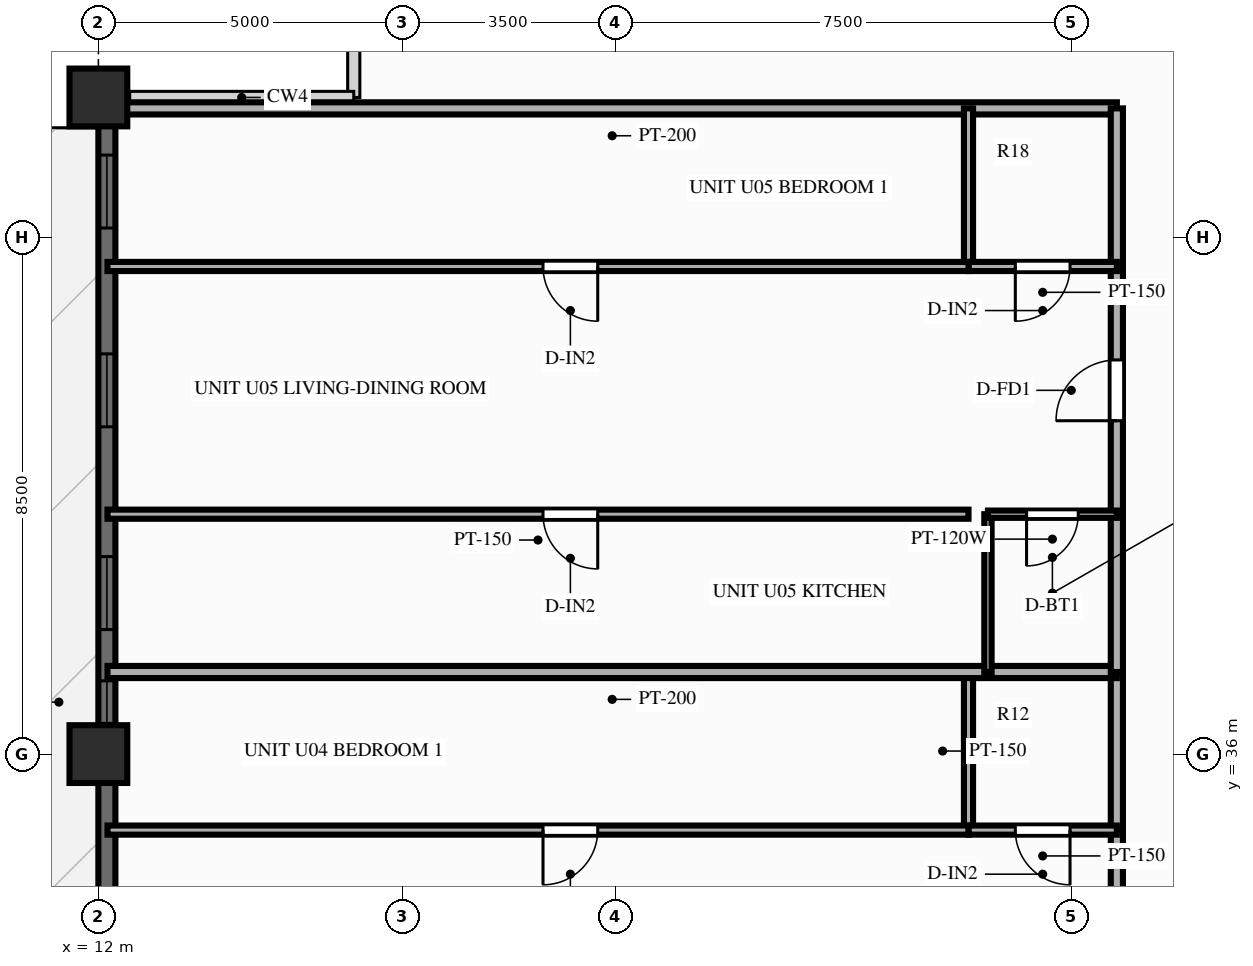
"""IFC4 building model, lengths in metres.
Left out: names, types, materials, properties, quantities, classifications, styles, units other than length and angle.
Written with IfcOpenShell. Run it as: python <this file> out.ifc"""

import sys

from ifc_helpers import new_model, si_unit, direction, frame, frame_2d, origin, origin_2d, place, context, subcontext, project, spatial, rectangle, extrude, source, transform, mapped, element, fill, save


model = new_model("IFC4")
c1 = context("Model", 3, precision=1e-05, world=origin(), true_north=direction((0.0, 1.0)))
c2 = subcontext(c1, "Body", "Model", "MODEL_VIEW")
j1 = project(units=[si_unit("LENGTHUNIT", "METRE"), si_unit("PLANEANGLEUNIT", "RADIAN")], contexts=[c1])
p1 = place(None, origin())
s1 = spatial("IfcSite", under=j1, at=p1, CompositionType="ELEMENT")
p2 = place(p1, origin())
s2 = spatial("IfcBuilding", under=s1, at=p2, CompositionType="ELEMENT")
p3 = place(p2, frame((0.0, 0.0, 135.75)))
s3 = spatial("IfcBuildingStorey", under=s2, at=p3, CompositionType="ELEMENT", Elevation=135.75)
m1 = source(origin(), c2, "Body", "SweptSolid", [
    extrude(rectangle(XDim=0.95, YDim=0.95, at=origin_2d()), origin(), (0.0, 0.0, 1.0), 3.0),
])
for number, where, z_axis, x_axis in (
    (1, (12.0, 46.8, 0.0), (0.0, 0.0, 1.0), (1.0, 0.0, 0.0)),
    (2, (12.0, 36.0, 0.0), (0.0, 0.0, 1.0), (1.0, 0.0, 0.0)),
):
    element("IfcColumn", number, at=place(p3, frame(where, z_axis=z_axis, x_axis=x_axis)), inside=s3, PredefinedType="COLUMN", context=c2, shape_type="MappedRepresentation", body=[
        mapped(m1, transform((0.0, 0.0, 0.0), scale=1.0)),
    ])
p4 = place(p3, frame((12.14, 7.2, 0.0), z_axis=(0.0, 0.0, 1.0), x_axis=(0.0, 1.0, 0.0)))
e3 = element("IfcWall", 3, at=p4, inside=s3, PredefinedType="SOLIDWALL", context=c2, shape_type="SweptSolid", body=[
    extrude(rectangle(XDim=39.6, YDim=0.28, at=frame_2d((19.8, 0.0))), origin(), (0.0, 0.0, 1.0), 2.28),
])
p5 = place(p4, frame((0.945, 0.0, 0.25)))
e4 = element("IfcOpeningElement", 4, at=p5, cuts=e3, PredefinedType="OPENING", context=c2, shape_type="SweptSolid", body=[
    extrude(rectangle(XDim=1.2, YDim=1.5, at=frame_2d((0.6, 0.75))), frame((0.0, 0.152, 0.0), z_axis=(0.0, -1.0, 0.0), x_axis=(1.0, 0.0, 0.0)), (0.0, 0.0, 1.0), 0.304),
])
p6 = place(p4, frame((4.213, 0.0, 0.25)))
e5 = element("IfcOpeningElement", 5, at=p6, cuts=e3, PredefinedType="OPENING", context=c2, shape_type="SweptSolid", body=[
    extrude(rectangle(XDim=1.2, YDim=1.5, at=frame_2d((0.6, 0.75))), frame((0.0, 0.152, 0.0), z_axis=(0.0, -1.0, 0.0), x_axis=(1.0, 0.0, 0.0)), (0.0, 0.0, 1.0), 0.304),
])
p7 = place(p4, frame((7.55, 0.0, 0.25)))
e6 = element("IfcOpeningElement", 6, at=p7, cuts=e3, PredefinedType="OPENING", context=c2, shape_type="SweptSolid", body=[
    extrude(rectangle(XDim=1.2, YDim=1.5, at=frame_2d((0.6, 0.75))), frame((0.0, 0.152, 0.0), z_axis=(0.0, -1.0, 0.0), x_axis=(1.0, 0.0, 0.0)), (0.0, 0.0, 1.0), 0.304),
])
p8 = place(p4, frame((13.483, 0.0, 0.25)))
e7 = element("IfcOpeningElement", 7, at=p8, cuts=e3, PredefinedType="OPENING", context=c2, shape_type="SweptSolid", body=[
    extrude(rectangle(XDim=1.2, YDim=1.5, at=frame_2d((0.6, 0.75))), frame((0.0, 0.152, 0.0), z_axis=(0.0, -1.0, 0.0), x_axis=(1.0, 0.0, 0.0)), (0.0, 0.0, 1.0), 0.304),
])
p9 = place(p4, frame((16.82, 0.0, 0.25)))
e8 = element("IfcOpeningElement", 8, at=p9, cuts=e3, PredefinedType="OPENING", context=c2, shape_type="SweptSolid", body=[
    extrude(rectangle(XDim=1.2, YDim=1.5, at=frame_2d((0.6, 0.75))), frame((0.0, 0.152, 0.0), z_axis=(0.0, -1.0, 0.0), x_axis=(1.0, 0.0, 0.0)), (0.0, 0.0, 1.0), 0.304),
])
p10 = place(p4, frame((19.2, 0.0, 0.25)))
e9 = element("IfcOpeningElement", 9, at=p10, cuts=e3, PredefinedType="OPENING", context=c2, shape_type="SweptSolid", body=[
    extrude(rectangle(XDim=1.2, YDim=1.5, at=frame_2d((0.6, 0.75))), frame((0.0, 0.152, 0.0), z_axis=(0.0, -1.0, 0.0), x_axis=(1.0, 0.0, 0.0)), (0.0, 0.0, 1.0), 0.304),
])
p11 = place(p4, frame((21.578, 0.0, 0.25)))
e10 = element("IfcOpeningElement", 10, at=p11, cuts=e3, PredefinedType="OPENING", context=c2, shape_type="SweptSolid", body=[
    extrude(rectangle(XDim=1.2, YDim=1.5, at=frame_2d((0.6, 0.75))), frame((0.0, 0.152, 0.0), z_axis=(0.0, -1.0, 0.0), x_axis=(1.0, 0.0, 0.0)), (0.0, 0.0, 1.0), 0.304),
])
p12 = place(p4, frame((24.713, 0.0, 0.0)))
e11 = element("IfcOpeningElement", 11, at=p12, cuts=e3, PredefinedType="OPENING", context=c2, shape_type="SweptSolid", body=[
    extrude(rectangle(XDim=1.6, YDim=2.15, at=frame_2d((0.8, 1.075))), frame((0.0, 0.152, 0.0), z_axis=(0.0, -1.0, 0.0), x_axis=(1.0, 0.0, 0.0)), (0.0, 0.0, 1.0), 0.304),
])
p13 = place(p4, frame((29.305, 0.0, 0.25)))
e12 = element("IfcOpeningElement", 12, at=p13, cuts=e3, PredefinedType="OPENING", context=c2, shape_type="SweptSolid", body=[
    extrude(rectangle(XDim=0.7, YDim=1.5, at=frame_2d((0.35, 0.75))), frame((0.0, 0.152, 0.0), z_axis=(0.0, -1.0, 0.0), x_axis=(1.0, 0.0, 0.0)), (0.0, 0.0, 1.0), 0.304),
])
p14 = place(p4, frame((30.848, 0.0, 0.25)))
e13 = element("IfcOpeningElement", 13, at=p14, cuts=e3, PredefinedType="OPENING", context=c2, shape_type="SweptSolid", body=[
    extrude(rectangle(XDim=1.2, YDim=1.5, at=frame_2d((0.6, 0.75))), frame((0.0, 0.152, 0.0), z_axis=(0.0, -1.0, 0.0), x_axis=(1.0, 0.0, 0.0)), (0.0, 0.0, 1.0), 0.304),
])
p15 = place(p4, frame((34.183, 0.0, 0.25)))
e14 = element("IfcOpeningElement", 14, at=p15, cuts=e3, PredefinedType="OPENING", context=c2, shape_type="SweptSolid", body=[
    extrude(rectangle(XDim=1.2, YDim=1.5, at=frame_2d((0.6, 0.75))), frame((0.0, 0.152, 0.0), z_axis=(0.0, -1.0, 0.0), x_axis=(1.0, 0.0, 0.0)), (0.0, 0.0, 1.0), 0.304),
])
p16 = place(p4, frame((37.452, 0.0, 0.25)))
e15 = element("IfcOpeningElement", 15, at=p16, cuts=e3, PredefinedType="OPENING", context=c2, shape_type="SweptSolid", body=[
    extrude(rectangle(XDim=1.2, YDim=1.5, at=frame_2d((0.6, 0.75))), frame((0.0, 0.152, 0.0), z_axis=(0.0, -1.0, 0.0), x_axis=(1.0, 0.0, 0.0)), (0.0, 0.0, 1.0), 0.304),
])
p17 = place(p3, frame((28.75, 46.62, 0.0), z_axis=(0.0, 0.0, 1.0), x_axis=(-1.0, 0.0, 0.0)))
e16 = element("IfcWall", 16, at=p17, inside=s3, PredefinedType="PARTITIONING", context=c2, shape_type="SweptSolid", body=[
    extrude(rectangle(XDim=16.6, YDim=0.2, at=frame_2d((8.3, 0.0))), origin(), (0.0, 0.0, 1.0), 2.79),
])
p18 = place(p3, frame((28.75, 30.676, 0.0), z_axis=(0.0, 0.0, 1.0), x_axis=(0.0, 1.0, 0.0)))
e17 = element("IfcWall", 17, at=p18, inside=s3, PredefinedType="PARTITIONING", context=c2, shape_type="SweptSolid", body=[
    extrude(rectangle(XDim=4.074, YDim=0.2, at=frame_2d((2.037, 0.0))), origin(), (0.0, 0.0, 1.0), 2.79),
])
p19 = place(p18, frame((1.537, 0.0, 0.0)))
e18 = element("IfcOpeningElement", 18, at=p19, cuts=e17, PredefinedType="OPENING", context=c2, shape_type="SweptSolid", body=[
    extrude(rectangle(XDim=1.0, YDim=2.15, at=frame_2d((0.5, 1.075))), frame((0.0, 0.112, 0.0), z_axis=(0.0, -1.0, 0.0), x_axis=(1.0, 0.0, 0.0)), (0.0, 0.0, 1.0), 0.224),
])
p20 = place(p3, frame((28.75, 34.75, 0.0), z_axis=(0.0, 0.0, 1.0), x_axis=(0.0, 1.0, 0.0)))
e19 = element("IfcWall", 19, at=p20, inside=s3, PredefinedType="PARTITIONING", context=c2, shape_type="SweptSolid", body=[
    extrude(rectangle(XDim=2.6, YDim=0.2, at=frame_2d((1.3, 0.0))), origin(), (0.0, 0.0, 1.0), 2.79),
])
p21 = place(p3, frame((26.31, 34.75, 0.0), z_axis=(0.0, 0.0, 1.0), x_axis=(0.0, 1.0, 0.0)))
e20 = element("IfcWall", 20, at=p21, inside=s3, PredefinedType="PARTITIONING", context=c2, shape_type="SweptSolid", body=[
    extrude(rectangle(XDim=2.6, YDim=0.15, at=frame_2d((1.3, 0.0))), origin(), (0.0, 0.0, 1.0), 2.79),
])
p22 = place(p3, frame((28.75, 34.75, 0.0), z_axis=(0.0, 0.0, 1.0), x_axis=(-1.0, 0.0, 0.0)))
e21 = element("IfcWall", 21, at=p22, inside=s3, PredefinedType="PARTITIONING", context=c2, shape_type="SweptSolid", body=[
    extrude(rectangle(XDim=2.44, YDim=0.15, at=frame_2d((1.22, 0.0))), origin(), (0.0, 0.0, 1.0), 2.79),
])
p23 = place(p22, frame((0.77, 0.0, 0.0)))
e22 = element("IfcOpeningElement", 22, at=p23, cuts=e21, PredefinedType="OPENING", context=c2, shape_type="SweptSolid", body=[
    extrude(rectangle(XDim=0.9, YDim=2.1, at=frame_2d((0.45, 1.05))), frame((0.0, 0.087, 0.0), z_axis=(0.0, -1.0, 0.0), x_axis=(1.0, 0.0, 0.0)), (0.0, 0.0, 1.0), 0.174),
])
p24 = place(p3, frame((26.31, 34.75, 0.0), z_axis=(0.0, 0.0, 1.0), x_axis=(-1.0, 0.0, 0.0)))
e23 = element("IfcWall", 23, at=p24, inside=s3, PredefinedType="PARTITIONING", context=c2, shape_type="SweptSolid", body=[
    extrude(rectangle(XDim=14.16, YDim=0.15, at=frame_2d((7.08, 0.0))), origin(), (0.0, 0.0, 1.0), 2.79),
])
p25 = place(p24, frame((6.097, 0.0, 0.0)))
e24 = element("IfcOpeningElement", 24, at=p25, cuts=e23, PredefinedType="OPENING", context=c2, shape_type="SweptSolid", body=[
    extrude(rectangle(XDim=0.9, YDim=2.1, at=frame_2d((0.45, 1.05))), frame((0.0, 0.087, 0.0), z_axis=(0.0, -1.0, 0.0), x_axis=(1.0, 0.0, 0.0)), (0.0, 0.0, 1.0), 0.174),
])
p26 = place(p3, frame((28.75, 37.35, 0.0), z_axis=(0.0, 0.0, 1.0), x_axis=(-1.0, 0.0, 0.0)))
e25 = element("IfcWall", 25, at=p26, inside=s3, PredefinedType="PARTITIONING", context=c2, shape_type="SweptSolid", body=[
    extrude(rectangle(XDim=16.6, YDim=0.2, at=frame_2d((8.3, 0.0))), origin(), (0.0, 0.0, 1.0), 2.79),
])
p27 = place(p3, frame((28.75, 37.35, 0.0), z_axis=(0.0, 0.0, 1.0), x_axis=(0.0, 1.0, 0.0)))
e26 = element("IfcWall", 26, at=p27, inside=s3, PredefinedType="PARTITIONING", context=c2, shape_type="SweptSolid", body=[
    extrude(rectangle(XDim=2.595, YDim=0.2, at=frame_2d((1.298, 0.0))), origin(), (0.0, 0.0, 1.0), 2.79),
])
p28 = place(p3, frame((28.75, 39.946, 0.0), z_axis=(0.0, 0.0, 1.0), x_axis=(0.0, 1.0, 0.0)))
e27 = element("IfcWall", 27, at=p28, inside=s3, PredefinedType="PARTITIONING", context=c2, shape_type="SweptSolid", body=[
    extrude(rectangle(XDim=4.074, YDim=0.2, at=frame_2d((2.037, 0.0))), origin(), (0.0, 0.0, 1.0), 2.79),
])
p29 = place(p28, frame((1.537, 0.0, 0.0)))
e28 = element("IfcOpeningElement", 28, at=p29, cuts=e27, PredefinedType="OPENING", context=c2, shape_type="SweptSolid", body=[
    extrude(rectangle(XDim=1.0, YDim=2.15, at=frame_2d((0.5, 1.075))), frame((0.0, 0.112, 0.0), z_axis=(0.0, -1.0, 0.0), x_axis=(1.0, 0.0, 0.0)), (0.0, 0.0, 1.0), 0.224),
])
p30 = place(p3, frame((28.75, 44.02, 0.0), z_axis=(0.0, 0.0, 1.0), x_axis=(0.0, 1.0, 0.0)))
e29 = element("IfcWall", 29, at=p30, inside=s3, PredefinedType="PARTITIONING", context=c2, shape_type="SweptSolid", body=[
    extrude(rectangle(XDim=2.6, YDim=0.2, at=frame_2d((1.3, 0.0))), origin(), (0.0, 0.0, 1.0), 2.79),
])
p31 = place(p3, frame((26.63, 37.35, 0.0), z_axis=(0.0, 0.0, 1.0), x_axis=(0.0, 1.0, 0.0)))
e30 = element("IfcWall", 30, at=p31, inside=s3, PredefinedType="PARTITIONING", context=c2, shape_type="SweptSolid", body=[
    extrude(rectangle(XDim=2.595, YDim=0.12, at=frame_2d((1.298, 0.0))), origin(), (0.0, 0.0, 1.0), 2.79),
])
p32 = place(p3, frame((26.31, 44.02, 0.0), z_axis=(0.0, 0.0, 1.0), x_axis=(0.0, 1.0, 0.0)))
e31 = element("IfcWall", 31, at=p32, inside=s3, PredefinedType="PARTITIONING", context=c2, shape_type="SweptSolid", body=[
    extrude(rectangle(XDim=2.6, YDim=0.15, at=frame_2d((1.3, 0.0))), origin(), (0.0, 0.0, 1.0), 2.79),
])
p33 = place(p3, frame((28.75, 39.946, 0.0), z_axis=(0.0, 0.0, 1.0), x_axis=(-1.0, 0.0, 0.0)))
e32 = element("IfcWall", 32, at=p33, inside=s3, PredefinedType="PARTITIONING", context=c2, shape_type="SweptSolid", body=[
    extrude(rectangle(XDim=2.12, YDim=0.12, at=frame_2d((1.06, 0.0))), origin(), (0.0, 0.0, 1.0), 2.79),
])
p34 = place(p33, frame((0.635, 0.0, 0.0)))
e33 = element("IfcOpeningElement", 33, at=p34, cuts=e32, PredefinedType="OPENING", context=c2, shape_type="SweptSolid", body=[
    extrude(rectangle(XDim=0.85, YDim=2.05, at=frame_2d((0.425, 1.025))), frame((0.0, 0.072, 0.0), z_axis=(0.0, -1.0, 0.0), x_axis=(1.0, 0.0, 0.0)), (0.0, 0.0, 1.0), 0.144),
])
p35 = place(p3, frame((26.31, 39.946, 0.0), z_axis=(0.0, 0.0, 1.0), x_axis=(-1.0, 0.0, 0.0)))
e34 = element("IfcWall", 34, at=p35, inside=s3, PredefinedType="PARTITIONING", context=c2, shape_type="SweptSolid", body=[
    extrude(rectangle(XDim=14.16, YDim=0.15, at=frame_2d((7.08, 0.0))), origin(), (0.0, 0.0, 1.0), 2.79),
])
p36 = place(p35, frame((6.097, 0.0, 0.0)))
e35 = element("IfcOpeningElement", 35, at=p36, cuts=e34, PredefinedType="OPENING", context=c2, shape_type="SweptSolid", body=[
    extrude(rectangle(XDim=0.9, YDim=2.1, at=frame_2d((0.45, 1.05))), frame((0.0, 0.087, 0.0), z_axis=(0.0, -1.0, 0.0), x_axis=(1.0, 0.0, 0.0)), (0.0, 0.0, 1.0), 0.174),
])
p37 = place(p3, frame((28.75, 44.02, 0.0), z_axis=(0.0, 0.0, 1.0), x_axis=(-1.0, 0.0, 0.0)))
e36 = element("IfcWall", 36, at=p37, inside=s3, PredefinedType="PARTITIONING", context=c2, shape_type="SweptSolid", body=[
    extrude(rectangle(XDim=2.44, YDim=0.15, at=frame_2d((1.22, 0.0))), origin(), (0.0, 0.0, 1.0), 2.79),
])
p38 = place(p37, frame((0.77, 0.0, 0.0)))
e37 = element("IfcOpeningElement", 37, at=p38, cuts=e36, PredefinedType="OPENING", context=c2, shape_type="SweptSolid", body=[
    extrude(rectangle(XDim=0.9, YDim=2.1, at=frame_2d((0.45, 1.05))), frame((0.0, 0.087, 0.0), z_axis=(0.0, -1.0, 0.0), x_axis=(1.0, 0.0, 0.0)), (0.0, 0.0, 1.0), 0.174),
])
p39 = place(p3, frame((26.31, 44.02, 0.0), z_axis=(0.0, 0.0, 1.0), x_axis=(-1.0, 0.0, 0.0)))
e38 = element("IfcWall", 38, at=p39, inside=s3, PredefinedType="PARTITIONING", context=c2, shape_type="SweptSolid", body=[
    extrude(rectangle(XDim=14.16, YDim=0.15, at=frame_2d((7.08, 0.0))), origin(), (0.0, 0.0, 1.0), 2.79),
])
p40 = place(p39, frame((6.097, 0.0, 0.0)))
e39 = element("IfcOpeningElement", 39, at=p40, cuts=e38, PredefinedType="OPENING", context=c2, shape_type="SweptSolid", body=[
    extrude(rectangle(XDim=0.9, YDim=2.1, at=frame_2d((0.45, 1.05))), frame((0.0, 0.087, 0.0), z_axis=(0.0, -1.0, 0.0), x_axis=(1.0, 0.0, 0.0)), (0.0, 0.0, 1.0), 0.174),
])
m2 = source(origin(), c2, "Body", "SweptSolid", [
    extrude(rectangle(XDim=0.7, YDim=1.5, at=frame_2d((0.35, 0.75))), frame((0.0, 0.03, 0.0), z_axis=(0.0, -1.0, 0.0), x_axis=(1.0, 0.0, 0.0)), (0.0, 0.0, 1.0), 0.06),
])
p41 = place(p13, origin())
e40 = element("IfcWindow", 40, at=p41, inside=s3, PartitioningType="SINGLE_PANEL", PredefinedType="WINDOW", context=c2, shape_type="MappedRepresentation", body=[
    mapped(m2, transform((0.0, 0.0, 0.0), scale=1.0)),
])
fill(e12, e40)
m3 = source(origin(), c2, "Body", "SweptSolid", [
    extrude(rectangle(XDim=1.2, YDim=1.5, at=frame_2d((0.6, 0.75))), frame((0.0, 0.03, 0.0), z_axis=(0.0, -1.0, 0.0), x_axis=(1.0, 0.0, 0.0)), (0.0, 0.0, 1.0), 0.06),
])
p42 = place(p14, origin())
e41 = element("IfcWindow", 41, at=p42, inside=s3, PartitioningType="SINGLE_PANEL", PredefinedType="WINDOW", context=c2, shape_type="MappedRepresentation", body=[
    mapped(m3, transform((0.0, 0.0, 0.0), scale=1.0)),
])
fill(e13, e41)
p43 = place(p15, origin())
e42 = element("IfcWindow", 42, at=p43, inside=s3, PartitioningType="SINGLE_PANEL", PredefinedType="WINDOW", context=c2, shape_type="MappedRepresentation", body=[
    mapped(m3, transform((0.0, 0.0, 0.0), scale=1.0)),
])
fill(e14, e42)
p44 = place(p16, origin())
e43 = element("IfcWindow", 43, at=p44, inside=s3, PartitioningType="SINGLE_PANEL", PredefinedType="WINDOW", context=c2, shape_type="MappedRepresentation", body=[
    mapped(m3, transform((0.0, 0.0, 0.0), scale=1.0)),
])
fill(e15, e43)
m4 = source(origin(), c2, "Body", "SweptSolid", [
    extrude(rectangle(XDim=0.9, YDim=2.1, at=frame_2d((0.45, 1.05))), frame((0.0, 0.025, 0.0), z_axis=(0.0, -1.0, 0.0), x_axis=(1.0, 0.0, 0.0)), (0.0, 0.0, 1.0), 0.05),
])
p45 = place(p23, origin())
e44 = element("IfcDoor", 44, at=p45, inside=s3, OperationType="SINGLE_SWING_LEFT", PredefinedType="DOOR", context=c2, shape_type="MappedRepresentation", body=[
    mapped(m4, transform((0.0, 0.0, 0.0), scale=1.0)),
])
fill(e22, e44)
p46 = place(p25, origin())
e45 = element("IfcDoor", 45, at=p46, inside=s3, OperationType="SINGLE_SWING_RIGHT", PredefinedType="DOOR", context=c2, shape_type="MappedRepresentation", body=[
    mapped(m4, transform((0.0, 0.0, 0.0), scale=1.0)),
])
fill(e24, e45)
m5 = source(origin(), c2, "Body", "SweptSolid", [
    extrude(rectangle(XDim=1.0, YDim=2.15, at=frame_2d((0.5, 1.075))), frame((0.0, 0.025, 0.0), z_axis=(0.0, -1.0, 0.0), x_axis=(1.0, 0.0, 0.0)), (0.0, 0.0, 1.0), 0.05),
])
p47 = place(p29, origin())
e46 = element("IfcDoor", 46, at=p47, inside=s3, OperationType="SINGLE_SWING_LEFT", PredefinedType="DOOR", context=c2, shape_type="MappedRepresentation", body=[
    mapped(m5, transform((0.0, 0.0, 0.0), scale=1.0)),
])
fill(e28, e46)
m6 = source(origin(), c2, "Body", "SweptSolid", [
    extrude(rectangle(XDim=0.85, YDim=2.05, at=frame_2d((0.425, 1.025))), frame((0.0, 0.025, 0.0), z_axis=(0.0, -1.0, 0.0), x_axis=(1.0, 0.0, 0.0)), (0.0, 0.0, 1.0), 0.05),
])
p48 = place(p34, origin())
e47 = element("IfcDoor", 47, at=p48, inside=s3, OperationType="SINGLE_SWING_RIGHT", PredefinedType="DOOR", context=c2, shape_type="MappedRepresentation", body=[
    mapped(m6, transform((0.0, 0.0, 0.0), scale=1.0)),
])
fill(e33, e47)
p49 = place(p36, origin())
e48 = element("IfcDoor", 48, at=p49, inside=s3, OperationType="SINGLE_SWING_LEFT", PredefinedType="DOOR", context=c2, shape_type="MappedRepresentation", body=[
    mapped(m4, transform((0.0, 0.0, 0.0), scale=1.0)),
])
fill(e35, e48)
p50 = place(p38, origin())
e49 = element("IfcDoor", 49, at=p50, inside=s3, OperationType="SINGLE_SWING_RIGHT", PredefinedType="DOOR", context=c2, shape_type="MappedRepresentation", body=[
    mapped(m4, transform((0.0, 0.0, 0.0), scale=1.0)),
])
fill(e37, e49)
p51 = place(p40, origin())
e50 = element("IfcDoor", 50, at=p51, inside=s3, OperationType="SINGLE_SWING_LEFT", PredefinedType="DOOR", context=c2, shape_type="MappedRepresentation", body=[
    mapped(m4, transform((0.0, 0.0, 0.0), scale=1.0)),
])
fill(e39, e50)
save(model, sys.argv[1])
